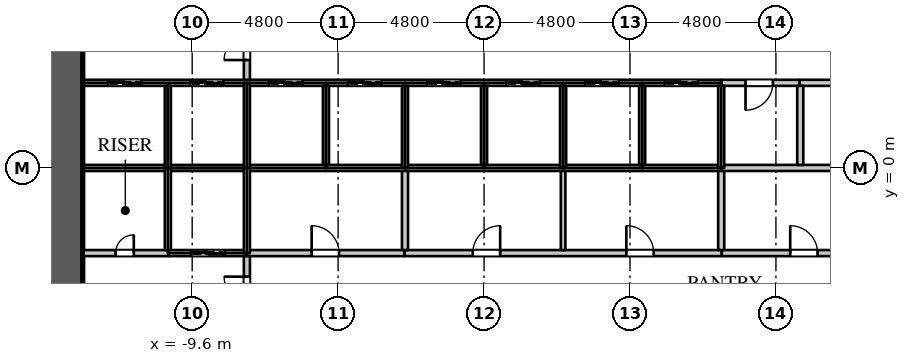
"""IFC4 building model, lengths in metres.
Left out: names, types, materials, properties, quantities, classifications, styles, units other than length and angle.
Written with IfcOpenShell. Run it as: python <this file> out.ifc"""

import sys

from ifc_helpers import new_model, si_unit, direction, frame, frame_2d, origin, place, context, subcontext, project, spatial, rectangle, extrude, element, fill, save


model = new_model("IFC4")
c1 = context("Model", 3, precision=1e-05, world=origin(), true_north=direction((0.0, 1.0)))
c2 = subcontext(c1, "Body", "Model", "MODEL_VIEW")
j1 = project(units=[si_unit("LENGTHUNIT", "METRE"), si_unit("PLANEANGLEUNIT", "RADIAN")], contexts=[c1])
p1 = place(None, origin())
s1 = spatial("IfcSite", under=j1, at=p1, CompositionType="ELEMENT")
p2 = place(p1, origin())
s2 = spatial("IfcBuilding", under=s1, at=p2, CompositionType="ELEMENT")
p3 = place(p2, frame((0.0, 0.0, -4.5)))
s3 = spatial("IfcBuildingStorey", under=s2, at=p3, CompositionType="ELEMENT", Elevation=-4.5)
p4 = place(p3, frame((-13.8, -10.8, 0.0), z_axis=(0.0, 0.0, 1.0), x_axis=(0.0, 1.0, 0.0)))
e1 = element("IfcWall", 1, at=p4, inside=s3, PredefinedType="SHEAR", context=c2, shape_type="SweptSolid", body=[
    extrude(rectangle(XDim=21.6, YDim=1.2, at=frame_2d((10.8, 0.0))), origin(), (0.0, 0.0, 1.0), 4.5),
])
p5 = place(p4, frame((15.5, 0.0, 0.0)))
e2 = element("IfcOpeningElement", 2, at=p5, cuts=e1, PredefinedType="OPENING", context=c2, shape_type="SweptSolid", body=[
    extrude(rectangle(XDim=1.5, YDim=2.4, at=frame_2d((0.75, 1.2))), frame((0.0, 0.61, 0.0), z_axis=(0.0, -1.0, 0.0), x_axis=(1.0, 0.0, 0.0)), (0.0, 0.0, 1.0), 1.22),
])
p6 = place(p4, frame((4.5, 0.0, 0.0)))
e3 = element("IfcOpeningElement", 3, at=p6, cuts=e1, PredefinedType="OPENING", context=c2, shape_type="SweptSolid", body=[
    extrude(rectangle(XDim=1.5, YDim=2.4, at=frame_2d((0.75, 1.2))), frame((0.0, 0.61, 0.0), z_axis=(0.0, -1.0, 0.0), x_axis=(1.0, 0.0, 0.0)), (0.0, 0.0, 1.0), 1.22),
])
p7 = place(p3, frame((-7.8, -8.075, 0.0), z_axis=(0.0, 0.0, 1.0), x_axis=(0.0, 1.0, 0.0)))
e4 = element("IfcWall", 4, at=p7, inside=s3, PredefinedType="PARTITIONING", context=c2, shape_type="SweptSolid", body=[
    extrude(rectangle(XDim=5.275, YDim=0.2, at=frame_2d((2.637, 0.0))), origin(), (0.0, 0.0, 1.0), 4.048),
])
p8 = place(p7, frame((3.0, 0.0, 0.0)))
e5 = element("IfcOpeningElement", 5, at=p8, cuts=e4, PredefinedType="OPENING", context=c2, shape_type="SweptSolid", body=[
    extrude(rectangle(XDim=1.5, YDim=2.4, at=frame_2d((0.75, 1.2))), frame((0.0, 0.11, 0.0), z_axis=(0.0, -1.0, 0.0), x_axis=(1.0, 0.0, 0.0)), (0.0, 0.0, 1.0), 0.22),
])
p9 = place(p3, frame((-7.8, 2.8, 0.0), z_axis=(0.0, 0.0, 1.0), x_axis=(0.0, 1.0, 0.0)))
e6 = element("IfcWall", 6, at=p9, inside=s3, PredefinedType="PARTITIONING", context=c2, shape_type="SweptSolid", body=[
    extrude(rectangle(XDim=5.275, YDim=0.2, at=frame_2d((2.637, 0.0))), origin(), (0.0, 0.0, 1.0), 4.048),
])
p10 = place(p9, frame((0.75, 0.0, 0.0)))
e7 = element("IfcOpeningElement", 7, at=p10, cuts=e6, PredefinedType="OPENING", context=c2, shape_type="SweptSolid", body=[
    extrude(rectangle(XDim=1.5, YDim=2.4, at=frame_2d((0.75, 1.2))), frame((0.0, 0.11, 0.0), z_axis=(0.0, -1.0, 0.0), x_axis=(1.0, 0.0, 0.0)), (0.0, 0.0, 1.0), 0.22),
])
p11 = place(p3, frame((-2.62, -2.8, 0.0), z_axis=(0.0, 0.0, 1.0), x_axis=(1.0, 0.0, 0.0)))
e8 = element("IfcWall", 8, at=p11, inside=s3, PredefinedType="PARTITIONING", context=c2, shape_type="SweptSolid", body=[
    extrude(rectangle(XDim=10.44, YDim=0.2, at=frame_2d((5.22, 0.0))), origin(), (0.0, 0.0, 1.0), 4.048),
])
p12 = place(p11, frame((2.25, 0.0, 0.0)))
e9 = element("IfcOpeningElement", 9, at=p12, cuts=e8, PredefinedType="OPENING", context=c2, shape_type="SweptSolid", body=[
    extrude(rectangle(XDim=0.9, YDim=2.2, at=frame_2d((0.45, 1.1))), frame((0.0, 0.11, 0.0), z_axis=(0.0, -1.0, 0.0), x_axis=(1.0, 0.0, 0.0)), (0.0, 0.0, 1.0), 0.22),
])
p13 = place(p11, frame((7.3, 0.0, 0.0)))
e10 = element("IfcOpeningElement", 10, at=p13, cuts=e8, PredefinedType="OPENING", context=c2, shape_type="SweptSolid", body=[
    extrude(rectangle(XDim=0.9, YDim=2.2, at=frame_2d((0.45, 1.1))), frame((0.0, 0.11, 0.0), z_axis=(0.0, -1.0, 0.0), x_axis=(1.0, 0.0, 0.0)), (0.0, 0.0, 1.0), 0.22),
])
p14 = place(p3, frame((7.8, 2.8, 0.0), z_axis=(0.0, 0.0, 1.0), x_axis=(1.0, 0.0, 0.0)))
e11 = element("IfcWall", 11, at=p14, inside=s3, PredefinedType="PARTITIONING", context=c2, shape_type="SweptSolid", body=[
    extrude(rectangle(XDim=2.58, YDim=0.2, at=frame_2d((1.29, 0.0))), origin(), (0.0, 0.0, 1.0), 4.048),
])
p15 = place(p14, frame((0.8, 0.0, 0.0)))
e12 = element("IfcOpeningElement", 12, at=p15, cuts=e11, PredefinedType="OPENING", context=c2, shape_type="SweptSolid", body=[
    extrude(rectangle(XDim=0.9, YDim=2.2, at=frame_2d((0.45, 1.1))), frame((0.0, 0.11, 0.0), z_axis=(0.0, -1.0, 0.0), x_axis=(1.0, 0.0, 0.0)), (0.0, 0.0, 1.0), 0.22),
])
p16 = place(p3, frame((2.6, -2.7, 0.0), z_axis=(0.0, 0.0, 1.0), x_axis=(0.0, 1.0, 0.0)))
e13 = element("IfcWall", 13, at=p16, inside=s3, PredefinedType="PARTITIONING", context=c2, shape_type="SweptSolid", body=[
    extrude(rectangle(XDim=2.7, YDim=0.15, at=frame_2d((1.35, 0.0))), origin(), (0.0, 0.0, 1.0), 4.048),
])
p17 = place(p3, frame((-13.17, -2.8, 0.0), z_axis=(0.0, 0.0, 1.0), x_axis=(1.0, 0.0, 0.0)))
e14 = element("IfcWall", 14, at=p17, inside=s3, PredefinedType="PARTITIONING", context=c2, shape_type="SweptSolid", body=[
    extrude(rectangle(XDim=2.79, YDim=0.2, at=frame_2d((1.395, 0.0))), origin(), (0.0, 0.0, 1.0), 4.048),
])
p18 = place(p17, frame((1.05, 0.0, 0.0)))
e15 = element("IfcOpeningElement", 15, at=p18, cuts=e14, PredefinedType="OPENING", context=c2, shape_type="SweptSolid", body=[
    extrude(rectangle(XDim=0.6, YDim=2.0, at=frame_2d((0.3, 1.0))), frame((0.0, 0.11, 0.0), z_axis=(0.0, -1.0, 0.0), x_axis=(1.0, 0.0, 0.0)), (0.0, 0.0, 1.0), 0.22),
])
p19 = place(p3, frame((-7.82, -2.8, 0.0), z_axis=(0.0, 0.0, 1.0), x_axis=(1.0, 0.0, 0.0)))
e16 = element("IfcWall", 16, at=p19, inside=s3, PredefinedType="PARTITIONING", context=c2, shape_type="SweptSolid", body=[
    extrude(rectangle(XDim=5.2, YDim=0.2, at=frame_2d((2.6, 0.0))), origin(), (0.0, 0.0, 1.0), 4.048),
])
p20 = place(p19, frame((2.15, 0.0, 0.0)))
e17 = element("IfcOpeningElement", 17, at=p20, cuts=e16, PredefinedType="OPENING", context=c2, shape_type="SweptSolid", body=[
    extrude(rectangle(XDim=0.9, YDim=2.2, at=frame_2d((0.45, 1.1))), frame((0.0, 0.11, 0.0), z_axis=(0.0, -1.0, 0.0), x_axis=(1.0, 0.0, 0.0)), (0.0, 0.0, 1.0), 0.22),
])
p21 = place(p3, frame((-2.6, -2.7, 0.0), z_axis=(0.0, 0.0, 1.0), x_axis=(0.0, 1.0, 0.0)))
e18 = element("IfcWall", 18, at=p21, inside=s3, PredefinedType="PARTITIONING", context=c2, shape_type="SweptSolid", body=[
    extrude(rectangle(XDim=2.7, YDim=0.2, at=frame_2d((1.35, 0.0))), origin(), (0.0, 0.0, 1.0), 4.048),
])
p22 = place(p3, frame((7.82, -2.8, 0.0), z_axis=(0.0, 0.0, 1.0), x_axis=(1.0, 0.0, 0.0)))
e19 = element("IfcWall", 19, at=p22, inside=s3, PredefinedType="PARTITIONING", context=c2, shape_type="SweptSolid", body=[
    extrude(rectangle(XDim=5.35, YDim=0.2, at=frame_2d((2.675, 0.0))), origin(), (0.0, 0.0, 1.0), 4.048),
])
p23 = place(p22, frame((2.25, 0.0, 0.0)))
e20 = element("IfcOpeningElement", 20, at=p23, cuts=e19, PredefinedType="OPENING", context=c2, shape_type="SweptSolid", body=[
    extrude(rectangle(XDim=0.9, YDim=2.2, at=frame_2d((0.45, 1.1))), frame((0.0, 0.11, 0.0), z_axis=(0.0, -1.0, 0.0), x_axis=(1.0, 0.0, 0.0)), (0.0, 0.0, 1.0), 0.22),
])
p24 = place(p3, frame((7.8, -2.7, 0.0), z_axis=(0.0, 0.0, 1.0), x_axis=(0.0, 1.0, 0.0)))
e21 = element("IfcWall", 21, at=p24, inside=s3, PredefinedType="PARTITIONING", context=c2, shape_type="SweptSolid", body=[
    extrude(rectangle(XDim=2.7, YDim=0.2, at=frame_2d((1.35, 0.0))), origin(), (0.0, 0.0, 1.0), 4.048),
])
p25 = place(p3, frame((7.8, 0.0, 0.0), z_axis=(0.0, 0.0, 1.0), x_axis=(1.0, 0.0, 0.0)))
e22 = element("IfcWall", 22, at=p25, inside=s3, PredefinedType="PARTITIONING", context=c2, shape_type="SweptSolid", body=[
    extrude(rectangle(XDim=5.37, YDim=0.2, at=frame_2d((2.685, 0.0))), origin(), (0.0, 0.0, 1.0), 4.048),
])
p26 = place(p3, frame((10.38, 2.8, 0.0), z_axis=(0.0, 0.0, 1.0), x_axis=(1.0, 0.0, 0.0)))
e23 = element("IfcWall", 23, at=p26, inside=s3, PredefinedType="PARTITIONING", context=c2, shape_type="SweptSolid", body=[
    extrude(rectangle(XDim=2.79, YDim=0.2, at=frame_2d((1.395, 0.0))), origin(), (0.0, 0.0, 1.0), 4.048),
])
p27 = place(p26, frame((1.05, 0.0, 0.0)))
e24 = element("IfcOpeningElement", 24, at=p27, cuts=e23, PredefinedType="OPENING", context=c2, shape_type="SweptSolid", body=[
    extrude(rectangle(XDim=0.6, YDim=2.0, at=frame_2d((0.3, 1.0))), frame((0.0, 0.11, 0.0), z_axis=(0.0, -1.0, 0.0), x_axis=(1.0, 0.0, 0.0)), (0.0, 0.0, 1.0), 0.22),
])
p28 = place(p3, frame((10.4, 0.1, 0.0), z_axis=(0.0, 0.0, 1.0), x_axis=(0.0, 1.0, 0.0)))
e25 = element("IfcWall", 25, at=p28, inside=s3, PredefinedType="PARTITIONING", context=c2, shape_type="SweptSolid", body=[
    extrude(rectangle(XDim=2.6, YDim=0.2, at=frame_2d((1.3, 0.0))), origin(), (0.0, 0.0, 1.0), 4.048),
])
p29 = place(p3, frame((-13.17, 0.0, 0.0), z_axis=(0.0, 0.0, 1.0), x_axis=(1.0, 0.0, 0.0)))
e26 = element("IfcWall", 26, at=p29, inside=s3, PredefinedType="PARTITIONING", context=c2, shape_type="SweptSolid", body=[
    extrude(rectangle(XDim=20.97, YDim=0.2, at=frame_2d((10.485, 0.0))), origin(), (0.0, 0.0, 1.0), 4.048),
])
p30 = place(p3, frame((-13.17, 2.8, 0.0), z_axis=(0.0, 0.0, 1.0), x_axis=(1.0, 0.0, 0.0)))
e27 = element("IfcWall", 27, at=p30, inside=s3, PredefinedType="PARTITIONING", context=c2, shape_type="SweptSolid", body=[
    extrude(rectangle(XDim=20.97, YDim=0.2, at=frame_2d((10.485, 0.0))), origin(), (0.0, 0.0, 1.0), 4.048),
])
p31 = place(p30, frame((0.8, 0.0, 0.0)))
e28 = element("IfcOpeningElement", 28, at=p31, cuts=e27, PredefinedType="OPENING", context=c2, shape_type="SweptSolid", body=[
    extrude(rectangle(XDim=1.1, YDim=2.2, at=frame_2d((0.55, 1.1))), frame((0.0, 0.11, 0.0), z_axis=(0.0, -1.0, 0.0), x_axis=(1.0, 0.0, 0.0)), (0.0, 0.0, 1.0), 0.22),
])
p32 = place(p30, frame((3.5, 0.0, 0.0)))
e29 = element("IfcOpeningElement", 29, at=p32, cuts=e27, PredefinedType="OPENING", context=c2, shape_type="SweptSolid", body=[
    extrude(rectangle(XDim=1.1, YDim=2.2, at=frame_2d((0.55, 1.1))), frame((0.0, 0.11, 0.0), z_axis=(0.0, -1.0, 0.0), x_axis=(1.0, 0.0, 0.0)), (0.0, 0.0, 1.0), 0.22),
])
p33 = place(p30, frame((6.1, 0.0, 0.0)))
e30 = element("IfcOpeningElement", 30, at=p33, cuts=e27, PredefinedType="OPENING", context=c2, shape_type="SweptSolid", body=[
    extrude(rectangle(XDim=1.1, YDim=2.2, at=frame_2d((0.55, 1.1))), frame((0.0, 0.11, 0.0), z_axis=(0.0, -1.0, 0.0), x_axis=(1.0, 0.0, 0.0)), (0.0, 0.0, 1.0), 0.22),
])
p34 = place(p30, frame((8.7, 0.0, 0.0)))
e31 = element("IfcOpeningElement", 31, at=p34, cuts=e27, PredefinedType="OPENING", context=c2, shape_type="SweptSolid", body=[
    extrude(rectangle(XDim=1.1, YDim=2.2, at=frame_2d((0.55, 1.1))), frame((0.0, 0.11, 0.0), z_axis=(0.0, -1.0, 0.0), x_axis=(1.0, 0.0, 0.0)), (0.0, 0.0, 1.0), 0.22),
])
p35 = place(p30, frame((11.3, 0.0, 0.0)))
e32 = element("IfcOpeningElement", 32, at=p35, cuts=e27, PredefinedType="OPENING", context=c2, shape_type="SweptSolid", body=[
    extrude(rectangle(XDim=1.1, YDim=2.2, at=frame_2d((0.55, 1.1))), frame((0.0, 0.11, 0.0), z_axis=(0.0, -1.0, 0.0), x_axis=(1.0, 0.0, 0.0)), (0.0, 0.0, 1.0), 0.22),
])
p36 = place(p30, frame((13.9, 0.0, 0.0)))
e33 = element("IfcOpeningElement", 33, at=p36, cuts=e27, PredefinedType="OPENING", context=c2, shape_type="SweptSolid", body=[
    extrude(rectangle(XDim=1.1, YDim=2.2, at=frame_2d((0.55, 1.1))), frame((0.0, 0.11, 0.0), z_axis=(0.0, -1.0, 0.0), x_axis=(1.0, 0.0, 0.0)), (0.0, 0.0, 1.0), 0.22),
])
p37 = place(p30, frame((16.5, 0.0, 0.0)))
e34 = element("IfcOpeningElement", 34, at=p37, cuts=e27, PredefinedType="OPENING", context=c2, shape_type="SweptSolid", body=[
    extrude(rectangle(XDim=1.1, YDim=2.2, at=frame_2d((0.55, 1.1))), frame((0.0, 0.11, 0.0), z_axis=(0.0, -1.0, 0.0), x_axis=(1.0, 0.0, 0.0)), (0.0, 0.0, 1.0), 0.22),
])
p38 = place(p30, frame((19.1, 0.0, 0.0)))
e35 = element("IfcOpeningElement", 35, at=p38, cuts=e27, PredefinedType="OPENING", context=c2, shape_type="SweptSolid", body=[
    extrude(rectangle(XDim=1.1, YDim=2.2, at=frame_2d((0.55, 1.1))), frame((0.0, 0.11, 0.0), z_axis=(0.0, -1.0, 0.0), x_axis=(1.0, 0.0, 0.0)), (0.0, 0.0, 1.0), 0.22),
])
p39 = place(p3, frame((-10.4, -2.7, 0.0), z_axis=(0.0, 0.0, 1.0), x_axis=(0.0, 1.0, 0.0)))
e36 = element("IfcWall", 36, at=p39, inside=s3, PredefinedType="PARTITIONING", context=c2, shape_type="SweptSolid", body=[
    extrude(rectangle(XDim=2.7, YDim=0.2, at=frame_2d((1.35, 0.0))), origin(), (0.0, 0.0, 1.0), 4.048),
])
p40 = place(p3, frame((-10.38, -2.8, 0.0), z_axis=(0.0, 0.0, 1.0), x_axis=(1.0, 0.0, 0.0)))
e37 = element("IfcWall", 37, at=p40, inside=s3, PredefinedType="PARTITIONING", context=c2, shape_type="SweptSolid", body=[
    extrude(rectangle(XDim=2.56, YDim=0.2, at=frame_2d((1.28, 0.0))), origin(), (0.0, 0.0, 1.0), 4.048),
])
p41 = place(p40, frame((0.75, 0.0, 0.0)))
e38 = element("IfcOpeningElement", 38, at=p41, cuts=e37, PredefinedType="OPENING", context=c2, shape_type="SweptSolid", body=[
    extrude(rectangle(XDim=1.1, YDim=2.2, at=frame_2d((0.55, 1.1))), frame((0.0, 0.11, 0.0), z_axis=(0.0, -1.0, 0.0), x_axis=(1.0, 0.0, 0.0)), (0.0, 0.0, 1.0), 0.22),
])
p42 = place(p3, frame((-10.4, 0.0, 0.0), z_axis=(0.0, 0.0, 1.0), x_axis=(0.0, 1.0, 0.0)))
e39 = element("IfcWall", 39, at=p42, inside=s3, PredefinedType="PARTITIONING", context=c2, shape_type="SweptSolid", body=[
    extrude(rectangle(XDim=2.7, YDim=0.2, at=frame_2d((1.35, 0.0))), origin(), (0.0, 0.0, 1.0), 4.048),
])
for number, where, z_axis, x_axis in (
    (40, (-7.8, -2.8, 0.0), (0.0, 0.0, 1.0), (0.0, 1.0, 0.0)),
    (41, (-7.8, 0.0, 0.0), (0.0, 0.0, 1.0), (0.0, 1.0, 0.0)),
):
    element("IfcWall", number, at=place(p3, frame(where, z_axis=z_axis, x_axis=x_axis)), inside=s3, PredefinedType="PARTITIONING", context=c2, shape_type="SweptSolid", body=[
        extrude(rectangle(XDim=2.8, YDim=0.2, at=frame_2d((1.4, 0.0))), origin(), (0.0, 0.0, 1.0), 4.048),
    ])
p43 = place(p3, frame((-5.2, 0.1, 0.0), z_axis=(0.0, 0.0, 1.0), x_axis=(0.0, 1.0, 0.0)))
e42 = element("IfcWall", 42, at=p43, inside=s3, PredefinedType="PARTITIONING", context=c2, shape_type="SweptSolid", body=[
    extrude(rectangle(XDim=2.6, YDim=0.2, at=frame_2d((1.3, 0.0))), origin(), (0.0, 0.0, 1.0), 4.048),
])
p44 = place(p3, frame((-2.6, 0.0, 0.0), z_axis=(0.0, 0.0, 1.0), x_axis=(0.0, 1.0, 0.0)))
e43 = element("IfcWall", 43, at=p44, inside=s3, PredefinedType="PARTITIONING", context=c2, shape_type="SweptSolid", body=[
    extrude(rectangle(XDim=2.7, YDim=0.2, at=frame_2d((1.35, 0.0))), origin(), (0.0, 0.0, 1.0), 4.048),
])
p45 = place(p3, frame((0.0, 0.1, 0.0), z_axis=(0.0, 0.0, 1.0), x_axis=(0.0, 1.0, 0.0)))
e44 = element("IfcWall", 44, at=p45, inside=s3, PredefinedType="PARTITIONING", context=c2, shape_type="SweptSolid", body=[
    extrude(rectangle(XDim=2.6, YDim=0.2, at=frame_2d((1.3, 0.0))), origin(), (0.0, 0.0, 1.0), 4.048),
])
p46 = place(p3, frame((2.6, 0.0, 0.0), z_axis=(0.0, 0.0, 1.0), x_axis=(0.0, 1.0, 0.0)))
e45 = element("IfcWall", 45, at=p46, inside=s3, PredefinedType="PARTITIONING", context=c2, shape_type="SweptSolid", body=[
    extrude(rectangle(XDim=2.7, YDim=0.2, at=frame_2d((1.35, 0.0))), origin(), (0.0, 0.0, 1.0), 4.048),
])
p47 = place(p3, frame((5.2, 0.1, 0.0), z_axis=(0.0, 0.0, 1.0), x_axis=(0.0, 1.0, 0.0)))
e46 = element("IfcWall", 46, at=p47, inside=s3, PredefinedType="PARTITIONING", context=c2, shape_type="SweptSolid", body=[
    extrude(rectangle(XDim=2.6, YDim=0.2, at=frame_2d((1.3, 0.0))), origin(), (0.0, 0.0, 1.0), 4.048),
])
p48 = place(p3, frame((7.8, 0.0, 0.0), z_axis=(0.0, 0.0, 1.0), x_axis=(0.0, 1.0, 0.0)))
e47 = element("IfcWall", 47, at=p48, inside=s3, PredefinedType="PARTITIONING", context=c2, shape_type="SweptSolid", body=[
    extrude(rectangle(XDim=2.7, YDim=0.2, at=frame_2d((1.35, 0.0))), origin(), (0.0, 0.0, 1.0), 4.048),
])
p49 = place(p18, origin())
e48 = element("IfcDoor", 48, at=p49, inside=s3, OperationType="SINGLE_SWING_RIGHT", PredefinedType="DOOR", context=c2, shape_type="SweptSolid", body=[
    extrude(rectangle(XDim=0.6, YDim=2.0, at=frame_2d((0.3, 1.0))), frame((0.0, 0.025, 0.0), z_axis=(0.0, -1.0, 0.0), x_axis=(1.0, 0.0, 0.0)), (0.0, 0.0, 1.0), 0.05),
])
fill(e15, e48)
p50 = place(p23, origin())
e49 = element("IfcDoor", 49, at=p50, inside=s3, OperationType="SINGLE_SWING_LEFT", PredefinedType="DOOR", context=c2, shape_type="SweptSolid", body=[
    extrude(rectangle(XDim=0.9, YDim=2.2, at=frame_2d((0.45, 1.1))), frame((0.0, 0.025, 0.0), z_axis=(0.0, -1.0, 0.0), x_axis=(1.0, 0.0, 0.0)), (0.0, 0.0, 1.0), 0.05),
])
fill(e20, e49)
p51 = place(p15, origin())
e50 = element("IfcDoor", 50, at=p51, inside=s3, OperationType="SINGLE_SWING_RIGHT", PredefinedType="DOOR", context=c2, shape_type="SweptSolid", body=[
    extrude(rectangle(XDim=0.9, YDim=2.2, at=frame_2d((0.45, 1.1))), frame((0.0, 0.025, 0.0), z_axis=(0.0, -1.0, 0.0), x_axis=(1.0, 0.0, 0.0)), (0.0, 0.0, 1.0), 0.05),
])
fill(e12, e50)
p52 = place(p20, origin())
e51 = element("IfcDoor", 51, at=p52, inside=s3, OperationType="SINGLE_SWING_LEFT", PredefinedType="DOOR", context=c2, shape_type="SweptSolid", body=[
    extrude(rectangle(XDim=0.9, YDim=2.2, at=frame_2d((0.45, 1.1))), frame((0.0, 0.025, 0.0), z_axis=(0.0, -1.0, 0.0), x_axis=(1.0, 0.0, 0.0)), (0.0, 0.0, 1.0), 0.05),
])
fill(e17, e51)
p53 = place(p12, origin())
e52 = element("IfcDoor", 52, at=p53, inside=s3, OperationType="SINGLE_SWING_RIGHT", PredefinedType="DOOR", context=c2, shape_type="SweptSolid", body=[
    extrude(rectangle(XDim=0.9, YDim=2.2, at=frame_2d((0.45, 1.1))), frame((0.0, 0.025, 0.0), z_axis=(0.0, -1.0, 0.0), x_axis=(1.0, 0.0, 0.0)), (0.0, 0.0, 1.0), 0.05),
])
fill(e9, e52)
p54 = place(p13, origin())
e53 = element("IfcDoor", 53, at=p54, inside=s3, OperationType="SINGLE_SWING_LEFT", PredefinedType="DOOR", context=c2, shape_type="SweptSolid", body=[
    extrude(rectangle(XDim=0.9, YDim=2.2, at=frame_2d((0.45, 1.1))), frame((0.0, 0.025, 0.0), z_axis=(0.0, -1.0, 0.0), x_axis=(1.0, 0.0, 0.0)), (0.0, 0.0, 1.0), 0.05),
])
fill(e10, e53)
p55 = place(p31, origin())
e54 = element("IfcDoor", 54, at=p55, inside=s3, OperationType="DOUBLE_DOOR_SLIDING", PredefinedType="DOOR", context=c2, shape_type="SweptSolid", body=[
    extrude(rectangle(XDim=1.1, YDim=2.2, at=frame_2d((0.55, 1.1))), frame((0.0, 0.025, 0.0), z_axis=(0.0, -1.0, 0.0), x_axis=(1.0, 0.0, 0.0)), (0.0, 0.0, 1.0), 0.05),
])
fill(e28, e54)
p56 = place(p32, origin())
e55 = element("IfcDoor", 55, at=p56, inside=s3, OperationType="DOUBLE_DOOR_SLIDING", PredefinedType="DOOR", context=c2, shape_type="SweptSolid", body=[
    extrude(rectangle(XDim=1.1, YDim=2.2, at=frame_2d((0.55, 1.1))), frame((0.0, 0.025, 0.0), z_axis=(0.0, -1.0, 0.0), x_axis=(1.0, 0.0, 0.0)), (0.0, 0.0, 1.0), 0.05),
])
fill(e29, e55)
p57 = place(p41, origin())
e56 = element("IfcDoor", 56, at=p57, inside=s3, OperationType="DOUBLE_DOOR_SLIDING", PredefinedType="DOOR", context=c2, shape_type="SweptSolid", body=[
    extrude(rectangle(XDim=1.1, YDim=2.2, at=frame_2d((0.55, 1.1))), frame((0.0, 0.025, 0.0), z_axis=(0.0, -1.0, 0.0), x_axis=(1.0, 0.0, 0.0)), (0.0, 0.0, 1.0), 0.05),
])
fill(e38, e56)
p58 = place(p33, origin())
e57 = element("IfcDoor", 57, at=p58, inside=s3, OperationType="DOUBLE_DOOR_SLIDING", PredefinedType="DOOR", context=c2, shape_type="SweptSolid", body=[
    extrude(rectangle(XDim=1.1, YDim=2.2, at=frame_2d((0.55, 1.1))), frame((0.0, 0.025, 0.0), z_axis=(0.0, -1.0, 0.0), x_axis=(1.0, 0.0, 0.0)), (0.0, 0.0, 1.0), 0.05),
])
fill(e30, e57)
p59 = place(p34, origin())
e58 = element("IfcDoor", 58, at=p59, inside=s3, OperationType="DOUBLE_DOOR_SLIDING", PredefinedType="DOOR", context=c2, shape_type="SweptSolid", body=[
    extrude(rectangle(XDim=1.1, YDim=2.2, at=frame_2d((0.55, 1.1))), frame((0.0, 0.025, 0.0), z_axis=(0.0, -1.0, 0.0), x_axis=(1.0, 0.0, 0.0)), (0.0, 0.0, 1.0), 0.05),
])
fill(e31, e58)
p60 = place(p35, origin())
e59 = element("IfcDoor", 59, at=p60, inside=s3, OperationType="DOUBLE_DOOR_SLIDING", PredefinedType="DOOR", context=c2, shape_type="SweptSolid", body=[
    extrude(rectangle(XDim=1.1, YDim=2.2, at=frame_2d((0.55, 1.1))), frame((0.0, 0.025, 0.0), z_axis=(0.0, -1.0, 0.0), x_axis=(1.0, 0.0, 0.0)), (0.0, 0.0, 1.0), 0.05),
])
fill(e32, e59)
p61 = place(p36, origin())
e60 = element("IfcDoor", 60, at=p61, inside=s3, OperationType="DOUBLE_DOOR_SLIDING", PredefinedType="DOOR", context=c2, shape_type="SweptSolid", body=[
    extrude(rectangle(XDim=1.1, YDim=2.2, at=frame_2d((0.55, 1.1))), frame((0.0, 0.025, 0.0), z_axis=(0.0, -1.0, 0.0), x_axis=(1.0, 0.0, 0.0)), (0.0, 0.0, 1.0), 0.05),
])
fill(e33, e60)
p62 = place(p37, origin())
e61 = element("IfcDoor", 61, at=p62, inside=s3, OperationType="DOUBLE_DOOR_SLIDING", PredefinedType="DOOR", context=c2, shape_type="SweptSolid", body=[
    extrude(rectangle(XDim=1.1, YDim=2.2, at=frame_2d((0.55, 1.1))), frame((0.0, 0.025, 0.0), z_axis=(0.0, -1.0, 0.0), x_axis=(1.0, 0.0, 0.0)), (0.0, 0.0, 1.0), 0.05),
])
fill(e34, e61)
p63 = place(p38, origin())
e62 = element("IfcDoor", 62, at=p63, inside=s3, OperationType="DOUBLE_DOOR_SLIDING", PredefinedType="DOOR", context=c2, shape_type="SweptSolid", body=[
    extrude(rectangle(XDim=1.1, YDim=2.2, at=frame_2d((0.55, 1.1))), frame((0.0, 0.025, 0.0), z_axis=(0.0, -1.0, 0.0), x_axis=(1.0, 0.0, 0.0)), (0.0, 0.0, 1.0), 0.05),
])
fill(e35, e62)
p64 = place(p10, origin())
e63 = element("IfcDoor", 63, at=p64, inside=s3, OperationType="DOUBLE_DOOR_SINGLE_SWING", PredefinedType="DOOR", context=c2, shape_type="SweptSolid", body=[
    extrude(rectangle(XDim=1.5, YDim=2.4, at=frame_2d((0.75, 1.2))), frame((0.0, 0.025, 0.0), z_axis=(0.0, -1.0, 0.0), x_axis=(1.0, 0.0, 0.0)), (0.0, 0.0, 1.0), 0.05),
])
fill(e7, e63)
p65 = place(p8, origin())
e64 = element("IfcDoor", 64, at=p65, inside=s3, OperationType="DOUBLE_DOOR_SINGLE_SWING", PredefinedType="DOOR", context=c2, shape_type="SweptSolid", body=[
    extrude(rectangle(XDim=1.5, YDim=2.4, at=frame_2d((0.75, 1.2))), frame((0.0, 0.025, 0.0), z_axis=(0.0, -1.0, 0.0), x_axis=(1.0, 0.0, 0.0)), (0.0, 0.0, 1.0), 0.05),
])
fill(e5, e64)
save(model, sys.argv[1])
